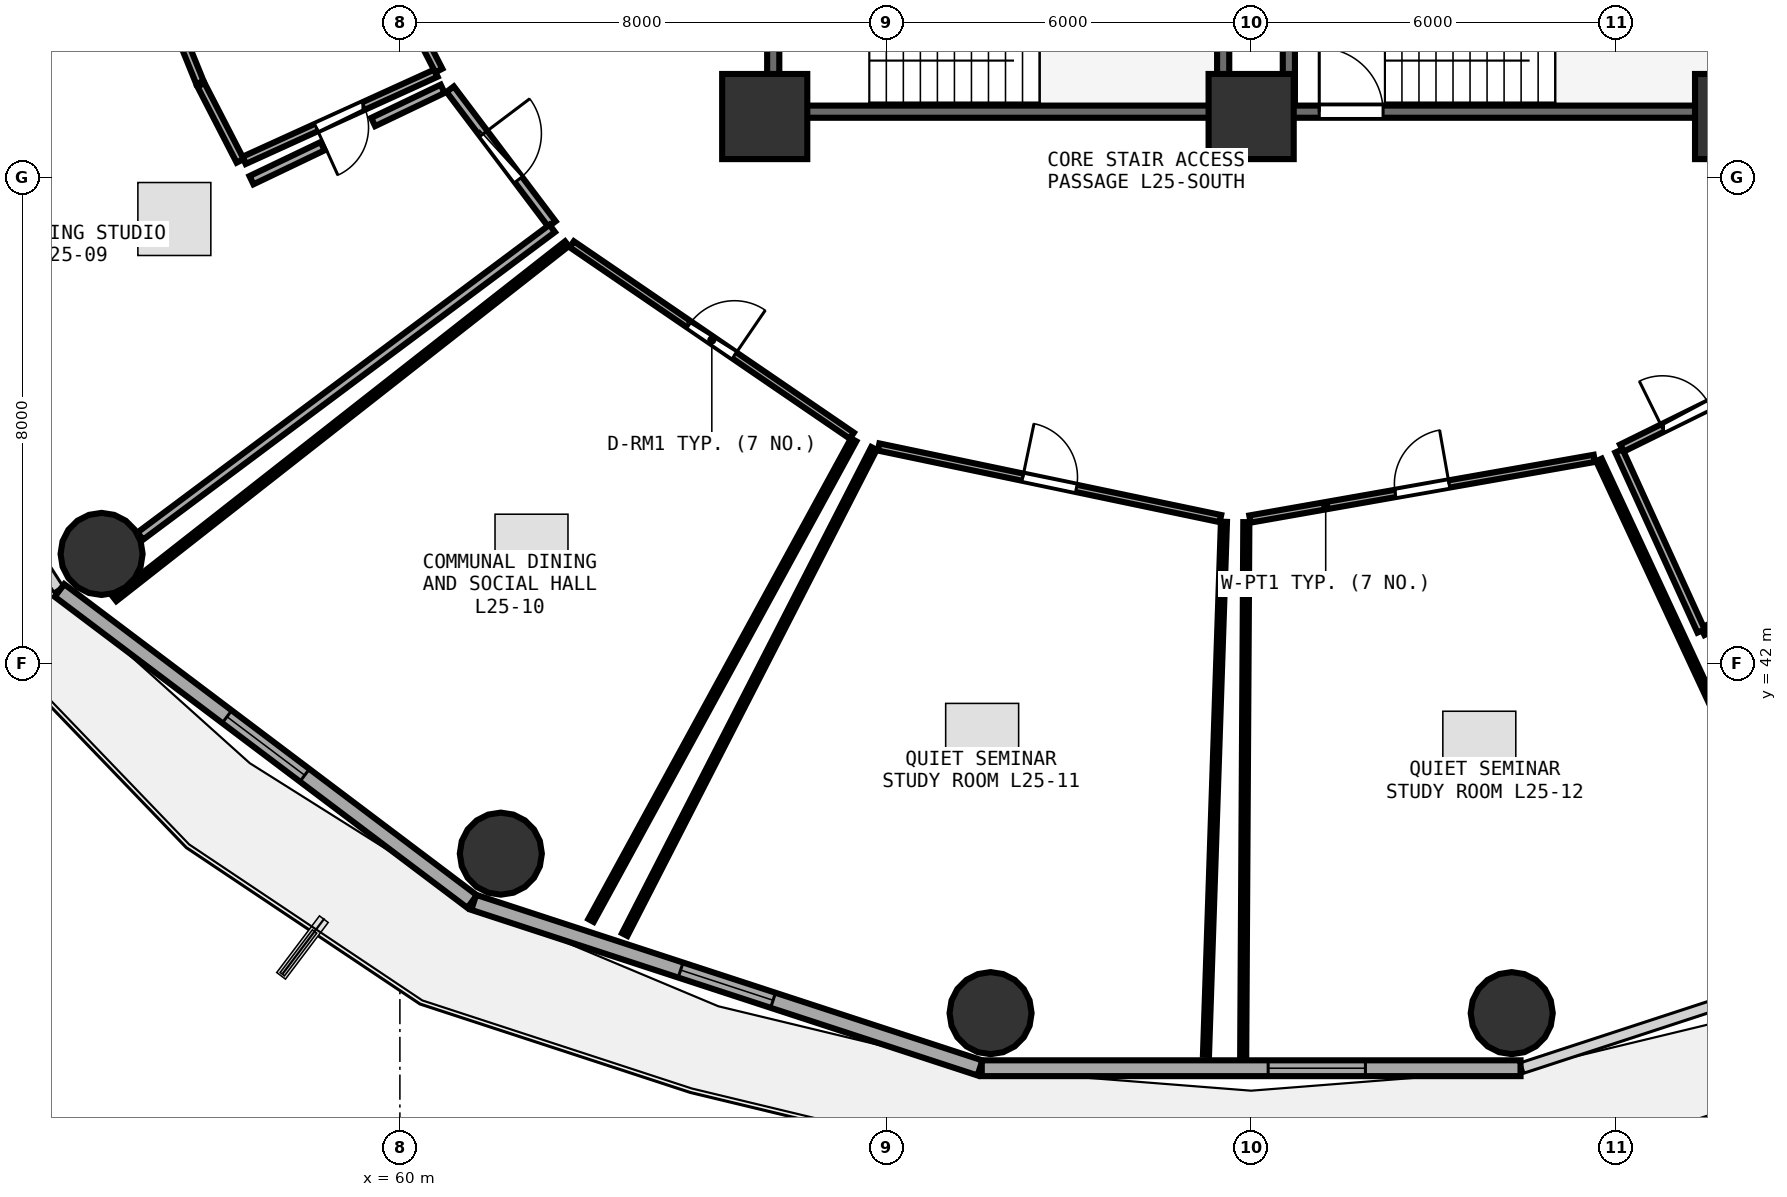
"""IFC4 building model, lengths in metres.
Left out: names, types, materials, properties, quantities, classifications, styles, units other than length and angle.
Written with IfcOpenShell. Run it as: python <this file> out.ifc"""

import sys

from ifc_helpers import new_model, si_unit, direction, frame, frame_2d, origin, origin_2d, place, context, subcontext, project, spatial, rectangle, circle, extrude, element, fill, save


model = new_model("IFC4")
c1 = context("Model", 3, precision=1e-05, world=origin(), true_north=direction((0.0, 1.0)))
c2 = subcontext(c1, "Body", "Model", "MODEL_VIEW")
j1 = project(units=[si_unit("LENGTHUNIT", "METRE"), si_unit("PLANEANGLEUNIT", "RADIAN")], contexts=[c1])
p1 = place(None, origin())
s1 = spatial("IfcSite", under=j1, at=p1, CompositionType="ELEMENT")
p2 = place(p1, origin())
s2 = spatial("IfcBuilding", under=s1, at=p2, CompositionType="ELEMENT")
p3 = place(p2, frame((0.0, 0.0, 98.85)))
s3 = spatial("IfcBuildingStorey", under=s2, at=p3, CompositionType="ELEMENT", Elevation=98.85)
for number, where, z_axis, x_axis in (
    (1, (66.0, 51.0, 0.0), (0.0, 0.0, 1.0), (1.0, 0.0, 0.0)),
    (2, (74.0, 51.0, 0.0), (0.0, 0.0, 1.0), (1.0, 0.0, 0.0)),
    (3, (82.0, 51.0, 0.0), (0.0, 0.0, 1.0), (1.0, 0.0, 0.0)),
):
    element("IfcColumn", number, at=place(p3, frame(where, z_axis=z_axis, x_axis=x_axis)), inside=s3, PredefinedType="PILASTER", context=c2, shape_type="SweptSolid", body=[
        extrude(rectangle(XDim=1.4, YDim=1.4, at=origin_2d()), origin(), (0.0, 0.0, 1.0), 3.75),
    ])
for number, where, z_axis, x_axis in (
    (4, (55.094, 43.807, 0.0), (0.0, 0.0, 1.0), (1.0, 0.0, 0.0)),
    (5, (61.66, 38.878, 0.0), (0.0, 0.0, 1.0), (1.0, 0.0, 0.0)),
    (6, (69.714, 36.255, 0.0), (0.0, 0.0, 1.0), (1.0, 0.0, 0.0)),
    (7, (78.286, 36.255, 0.0), (0.0, 0.0, 1.0), (1.0, 0.0, 0.0)),
):
    element("IfcColumn", number, at=place(p3, frame(where, z_axis=z_axis, x_axis=x_axis)), inside=s3, PredefinedType="COLUMN", context=c2, shape_type="SweptSolid", body=[
        extrude(circle(Radius=0.675, at=origin_2d()), origin(), (0.0, 0.0, 1.0), 3.75),
    ])
p4 = place(p3, frame((54.401, 43.207, 0.0), z_axis=(0.0, 0.0, 1.0), x_axis=(0.798501507879, -0.601992808857, 0.0)))
e8 = element("IfcWall", 8, at=p4, inside=s3, PredefinedType="SOLIDWALL", context=c2, shape_type="SweptSolid", body=[
    extrude(rectangle(XDim=8.499, YDim=0.26, at=frame_2d((4.25, 0.0))), origin(), (0.0, 0.0, 1.0), 3.475),
])
p5 = place(p4, frame((3.45, 0.0, 0.85)))
e9 = element("IfcOpeningElement", 9, at=p5, cuts=e8, PredefinedType="OPENING", context=c2, shape_type="SweptSolid", body=[
    extrude(rectangle(XDim=1.6, YDim=1.45, at=frame_2d((0.8, 0.725))), frame((0.0, 0.14, 0.0), z_axis=(0.0, -1.0, 0.0), x_axis=(1.0, 0.0, 0.0)), (0.0, 0.0, 1.0), 0.28),
])
p6 = place(p3, frame((61.214, 38.077, 0.0), z_axis=(0.0, 0.0, 1.0), x_axis=(0.950471101963, -0.310812941064, 0.0)))
e10 = element("IfcWall", 10, at=p6, inside=s3, PredefinedType="SOLIDWALL", context=c2, shape_type="SweptSolid", body=[
    extrude(rectangle(XDim=8.76, YDim=0.26, at=frame_2d((4.38, 0.0))), origin(), (0.0, 0.0, 1.0), 3.475),
])
p7 = place(p6, frame((3.58, 0.0, 0.85)))
e11 = element("IfcOpeningElement", 11, at=p7, cuts=e10, PredefinedType="OPENING", context=c2, shape_type="SweptSolid", body=[
    extrude(rectangle(XDim=1.6, YDim=1.45, at=frame_2d((0.8, 0.725))), frame((0.0, 0.14, 0.0), z_axis=(0.0, -1.0, 0.0), x_axis=(1.0, 0.0, 0.0)), (0.0, 0.0, 1.0), 0.28),
])
p8 = place(p3, frame((69.57, 35.349, 0.0), z_axis=(0.0, 0.0, 1.0), x_axis=(1.0, 0.0, 0.0)))
e12 = element("IfcWall", 12, at=p8, inside=s3, PredefinedType="SOLIDWALL", context=c2, shape_type="SweptSolid", body=[
    extrude(rectangle(XDim=8.861, YDim=0.26, at=frame_2d((4.43, 0.0))), origin(), (0.0, 0.0, 1.0), 3.475),
])
p9 = place(p8, frame((4.71, 0.0, 0.85)))
e13 = element("IfcOpeningElement", 13, at=p9, cuts=e12, PredefinedType="OPENING", context=c2, shape_type="SweptSolid", body=[
    extrude(rectangle(XDim=1.6, YDim=1.45, at=frame_2d((0.8, 0.725))), frame((0.0, 0.14, 0.0), z_axis=(0.0, -1.0, 0.0), x_axis=(1.0, 0.0, 0.0)), (0.0, 0.0, 1.0), 0.28),
])
p10 = place(p3, frame((74.0, 51.08, 0.0), z_axis=(0.0, 0.0, 1.0), x_axis=(1.0, 0.0, 0.0)))
e14 = element("IfcWall", 14, at=p10, inside=s3, PredefinedType="SHEAR", context=c2, shape_type="SweptSolid", body=[
    extrude(rectangle(XDim=7.9, YDim=0.2, at=frame_2d((3.95, 0.0))), origin(), (0.0, 0.0, 1.0), 3.49),
])
p11 = place(p10, frame((1.12, 0.0, 0.0)))
e15 = element("IfcOpeningElement", 15, at=p11, cuts=e14, PredefinedType="OPENING", context=c2, shape_type="SweptSolid", body=[
    extrude(rectangle(XDim=1.05, YDim=2.1, at=frame_2d((0.525, 1.05))), frame((0.0, 0.11, 0.0), z_axis=(0.0, -1.0, 0.0), x_axis=(1.0, 0.0, 0.0)), (0.0, 0.0, 1.0), 0.22),
])
p12 = place(p3, frame((74.62, 54.27, 0.0), z_axis=(0.0, 0.0, 1.0), x_axis=(0.0, -1.0, 0.0)))
e16 = element("IfcWall", 16, at=p12, inside=s3, PredefinedType="SHEAR", context=c2, shape_type="SweptSolid", body=[
    extrude(rectangle(XDim=3.07, YDim=0.2, at=frame_2d((1.535, 0.0))), origin(), (0.0, 0.0, 1.0), 3.49),
])
p13 = place(p3, frame((66.26, 51.08, 0.0), z_axis=(0.0, 0.0, 1.0), x_axis=(1.0, 0.0, 0.0)))
e17 = element("IfcWall", 17, at=p13, inside=s3, PredefinedType="SHEAR", context=c2, shape_type="SweptSolid", body=[
    extrude(rectangle(XDim=7.16, YDim=0.2, at=frame_2d((3.58, 0.0))), origin(), (0.0, 0.0, 1.0), 3.49),
])
p14 = place(p3, frame((73.54, 51.2, 0.0), z_axis=(0.0, 0.0, 1.0), x_axis=(0.0, 1.0, 0.0)))
e18 = element("IfcWall", 18, at=p14, inside=s3, PredefinedType="SHEAR", context=c2, shape_type="SweptSolid", body=[
    extrude(rectangle(XDim=3.07, YDim=0.2, at=frame_2d((1.535, 0.0))), origin(), (0.0, 0.0, 1.0), 3.49),
])
p15 = place(p3, frame((66.14, 54.27, 0.0), z_axis=(0.0, 0.0, 1.0), x_axis=(0.0, -1.0, 0.0)))
e19 = element("IfcWall", 19, at=p15, inside=s3, PredefinedType="SHEAR", context=c2, shape_type="SweptSolid", body=[
    extrude(rectangle(XDim=3.07, YDim=0.2, at=frame_2d((1.535, 0.0))), origin(), (0.0, 0.0, 1.0), 3.49),
])
p16 = place(p15, frame((1.01, 0.0, 0.0)))
e20 = element("IfcOpeningElement", 20, at=p16, cuts=e19, PredefinedType="OPENING", context=c2, shape_type="SweptSolid", body=[
    extrude(rectangle(XDim=1.05, YDim=2.1, at=frame_2d((0.525, 1.05))), frame((0.0, 0.11, 0.0), z_axis=(0.0, -1.0, 0.0), x_axis=(1.0, 0.0, 0.0)), (0.0, 0.0, 1.0), 0.22),
])
p17 = place(p3, frame((60.594, 51.714, 0.0), z_axis=(0.0, 0.0, 1.0), x_axis=(-0.910380938799, -0.413771127885, 0.0)))
e21 = element("IfcWall", 21, at=p17, inside=s3, PredefinedType="PLUMBINGWALL", context=c2, shape_type="SweptSolid", body=[
    extrude(rectangle(XDim=3.469, YDim=0.13, at=frame_2d((1.734, 0.0))), origin(), (0.0, 0.0, 1.0), 2.925),
])
p18 = place(p17, frame((1.304, 0.0, 0.0)))
e22 = element("IfcOpeningElement", 22, at=p18, cuts=e21, PredefinedType="OPENING", context=c2, shape_type="SweptSolid", body=[
    extrude(rectangle(XDim=0.86, YDim=2.05, at=frame_2d((0.43, 1.025))), frame((0.0, 0.075, 0.0), z_axis=(0.0, -1.0, 0.0), x_axis=(1.0, 0.0, 0.0)), (0.0, 0.0, 1.0), 0.15),
])
p19 = place(p3, frame((60.827, 51.45, 0.0), z_axis=(0.0, 0.0, 1.0), x_axis=(0.602330864847, -0.798246534131, 0.0)))
e23 = element("IfcWall", 23, at=p19, inside=s3, PredefinedType="PARTITIONING", context=c2, shape_type="SweptSolid", body=[
    extrude(rectangle(XDim=2.779, YDim=0.15, at=frame_2d((1.389, 0.0))), origin(), (0.0, 0.0, 1.0), 2.925),
])
p20 = place(p19, frame((0.914, 0.0, 0.0)))
e24 = element("IfcOpeningElement", 24, at=p20, cuts=e23, PredefinedType="OPENING", context=c2, shape_type="SweptSolid", body=[
    extrude(rectangle(XDim=0.95, YDim=2.08, at=frame_2d((0.475, 1.04))), frame((0.0, 0.085, 0.0), z_axis=(0.0, -1.0, 0.0), x_axis=(1.0, 0.0, 0.0)), (0.0, 0.0, 1.0), 0.17),
])
p21 = place(p3, frame((62.827, 48.899, 0.0), z_axis=(0.0, 0.0, 1.0), x_axis=(0.825618475233, -0.564228795219, 0.0)))
e25 = element("IfcWall", 25, at=p21, inside=s3, PredefinedType="PARTITIONING", context=c2, shape_type="SweptSolid", body=[
    extrude(rectangle(XDim=5.578, YDim=0.12, at=frame_2d((2.789, 0.0))), origin(), (0.0, 0.0, 1.0), 2.925),
])
p22 = place(p21, frame((2.339, 0.0, 0.0)))
e26 = element("IfcOpeningElement", 26, at=p22, cuts=e25, PredefinedType="OPENING", context=c2, shape_type="SweptSolid", body=[
    extrude(rectangle(XDim=0.9, YDim=2.08, at=frame_2d((0.45, 1.04))), frame((0.0, 0.07, 0.0), z_axis=(0.0, -1.0, 0.0), x_axis=(1.0, 0.0, 0.0)), (0.0, 0.0, 1.0), 0.14),
])
p23 = place(p3, frame((67.874, 45.566, 0.0), z_axis=(0.0, 0.0, 1.0), x_axis=(0.978759890472, -0.205009943184, 0.0)))
e27 = element("IfcWall", 27, at=p23, inside=s3, PredefinedType="PARTITIONING", context=c2, shape_type="SweptSolid", body=[
    extrude(rectangle(XDim=5.744, YDim=0.12, at=frame_2d((2.872, 0.0))), origin(), (0.0, 0.0, 1.0), 3.235),
])
p24 = place(p23, frame((2.422, 0.0, 0.0)))
e28 = element("IfcOpeningElement", 28, at=p24, cuts=e27, PredefinedType="OPENING", context=c2, shape_type="SweptSolid", body=[
    extrude(rectangle(XDim=0.9, YDim=2.08, at=frame_2d((0.45, 1.04))), frame((0.0, 0.07, 0.0), z_axis=(0.0, -1.0, 0.0), x_axis=(1.0, 0.0, 0.0)), (0.0, 0.0, 1.0), 0.14),
])
p25 = place(p3, frame((73.98, 44.38, 0.0), z_axis=(0.0, 0.0, 1.0), x_axis=(0.984819435921, 0.17358190756, 0.0)))
e29 = element("IfcWall", 29, at=p25, inside=s3, PredefinedType="PARTITIONING", context=c2, shape_type="SweptSolid", body=[
    extrude(rectangle(XDim=5.751, YDim=0.12, at=frame_2d((2.875, 0.0))), origin(), (0.0, 0.0, 1.0), 3.235),
])
p26 = place(p25, frame((2.426, 0.0, 0.0)))
e30 = element("IfcOpeningElement", 30, at=p26, cuts=e29, PredefinedType="OPENING", context=c2, shape_type="SweptSolid", body=[
    extrude(rectangle(XDim=0.9, YDim=2.08, at=frame_2d((0.45, 1.04))), frame((0.0, 0.07, 0.0), z_axis=(0.0, -1.0, 0.0), x_axis=(1.0, 0.0, 0.0)), (0.0, 0.0, 1.0), 0.14),
])
p27 = place(p3, frame((80.095, 45.546, 0.0), z_axis=(0.0, 0.0, 1.0), x_axis=(0.897003770221, 0.442022891046, 0.0)))
e31 = element("IfcWall", 31, at=p27, inside=s3, PredefinedType="PLUMBINGWALL", context=c2, shape_type="SweptSolid", body=[
    extrude(rectangle(XDim=2.355, YDim=0.13, at=frame_2d((1.178, 0.0))), origin(), (0.0, 0.0, 1.0), 2.925),
])
p28 = place(p27, frame((0.747, 0.0, 0.0)))
e32 = element("IfcOpeningElement", 32, at=p28, cuts=e31, PredefinedType="OPENING", context=c2, shape_type="SweptSolid", body=[
    extrude(rectangle(XDim=0.86, YDim=2.05, at=frame_2d((0.43, 1.025))), frame((0.0, 0.075, 0.0), z_axis=(0.0, -1.0, 0.0), x_axis=(1.0, 0.0, 0.0)), (0.0, 0.0, 1.0), 0.15),
])
p29 = place(p3, frame((59.535, 54.165, 0.0), z_axis=(0.0, 0.0, 1.0), x_axis=(-0.968404670054, -0.249384031201, 0.0)))
e33 = element("IfcWall", 33, at=p29, inside=s3, PredefinedType="PARTITIONING", context=c2, shape_type="SweptSolid", body=[
    extrude(rectangle(XDim=9.881, YDim=0.1, at=frame_2d((4.94, 0.0))), origin(), (0.0, 0.0, 1.0), 2.975),
])
p30 = place(p3, frame((60.125, 52.761, 0.0), z_axis=(0.0, 0.0, 1.0), x_axis=(0.456189291516, -0.889882762113, 0.0)))
e34 = element("IfcWall", 34, at=p30, inside=s3, PredefinedType="PLUMBINGWALL", context=c2, shape_type="SweptSolid", body=[
    extrude(rectangle(XDim=1.129, YDim=0.13, at=frame_2d((0.564, 0.0))), origin(), (0.0, 0.0, 1.0), 3.235),
])
p31 = place(p3, frame((57.373, 50.272, 0.0), z_axis=(0.0, 0.0, 1.0), x_axis=(-0.458147751042, 0.888876053348, 0.0)))
e35 = element("IfcWall", 35, at=p31, inside=s3, PredefinedType="PLUMBINGWALL", context=c2, shape_type="SweptSolid", body=[
    extrude(rectangle(XDim=1.407, YDim=0.13, at=frame_2d((0.703, 0.0))), origin(), (0.0, 0.0, 1.0), 2.925),
])
p32 = place(p3, frame((56.711, 51.559, 0.0), z_axis=(0.0, 0.0, 1.0), x_axis=(-0.376021150564, 0.926611080405, 0.0)))
e36 = element("IfcWall", 36, at=p32, inside=s3, PredefinedType="PLUMBINGWALL", context=c2, shape_type="SweptSolid", body=[
    extrude(rectangle(XDim=1.398, YDim=0.13, at=frame_2d((0.699, 0.0))), origin(), (0.0, 0.0, 1.0), 3.175),
])
p33 = place(p3, frame((62.505, 49.16, 0.0), z_axis=(0.0, 0.0, 1.0), x_axis=(-0.801231684565, -0.598354232582, 0.0)))
e37 = element("IfcWall", 37, at=p33, inside=s3, PredefinedType="PARTITIONING", context=c2, shape_type="SweptSolid", body=[
    extrude(rectangle(XDim=8.456, YDim=0.15, at=frame_2d((4.228, 0.0))), origin(), (0.0, 0.0, 1.0), 2.925),
])
p34 = place(p3, frame((50.146, 51.176, 0.0), z_axis=(0.0, 0.0, 1.0), x_axis=(0.962685643461, 0.270622157028, 0.0)))
e38 = element("IfcWall", 38, at=p34, inside=s3, PredefinedType="PARTITIONING", context=c2, shape_type="SweptSolid", body=[
    extrude(rectangle(XDim=6.187, YDim=0.15, at=frame_2d((3.094, 0.0))), origin(), (0.0, 0.0, 1.0), 2.975),
])
p35 = place(p3, frame((57.559, 49.953, 0.0), z_axis=(0.0, 0.0, 1.0), x_axis=(0.902185129063, 0.431349038364, 0.0)))
e39 = element("IfcWall", 39, at=p35, inside=s3, PredefinedType="PARTITIONING", context=c2, shape_type="SweptSolid", body=[
    extrude(rectangle(XDim=1.298, YDim=0.15, at=frame_2d((0.649, 0.0))), origin(), (0.0, 0.0, 1.0), 3.175),
])
p36 = place(p3, frame((59.561, 50.91, 0.0), z_axis=(0.0, 0.0, 1.0), x_axis=(0.902228812368, 0.431257660955, 0.0)))
e40 = element("IfcWall", 40, at=p36, inside=s3, PredefinedType="PARTITIONING", context=c2, shape_type="SweptSolid", body=[
    extrude(rectangle(XDim=1.266, YDim=0.15, at=frame_2d((0.633, 0.0))), origin(), (0.0, 0.0, 1.0), 2.925),
])
p37 = place(p3, frame((67.463, 45.683, 0.0), z_axis=(0.0, 0.0, 1.0), x_axis=(-0.479571724153, -0.87750268455, 0.0)))
e41 = element("IfcWall", 41, at=p37, inside=s3, PredefinedType="PARTITIONING", context=c2, shape_type="SweptSolid", body=[
    extrude(rectangle(XDim=9.007, YDim=0.1, at=frame_2d((4.503, 0.0))), origin(), (0.0, 0.0, 1.0), 2.925),
])
p38 = place(p3, frame((55.305, 43.071, 0.0), z_axis=(0.0, 0.0, 1.0), x_axis=(0.78679196563, 0.6172182781, 0.0)))
e42 = element("IfcWall", 42, at=p38, inside=s3, PredefinedType="PARTITIONING", context=c2, shape_type="SweptSolid", body=[
    extrude(rectangle(XDim=9.458, YDim=0.1, at=frame_2d((4.729, 0.0))), origin(), (0.0, 0.0, 1.0), 2.925),
])
p39 = place(p3, frame((73.553, 44.336, 0.0), z_axis=(0.0, 0.0, 1.0), x_axis=(-0.033680921614, -0.999432636809, 0.0)))
e43 = element("IfcWall", 43, at=p39, inside=s3, PredefinedType="PARTITIONING", context=c2, shape_type="SweptSolid", body=[
    extrude(rectangle(XDim=8.771, YDim=0.1, at=frame_2d((4.385, 0.0))), origin(), (0.0, 0.0, 1.0), 2.975),
])
p40 = place(p3, frame((63.697, 37.548, 0.0), z_axis=(0.0, 0.0, 1.0), x_axis=(0.456266444918, 0.889843205987, 0.0)))
e44 = element("IfcWall", 44, at=p40, inside=s3, PredefinedType="PARTITIONING", context=c2, shape_type="SweptSolid", body=[
    extrude(rectangle(XDim=8.985, YDim=0.1, at=frame_2d((4.492, 0.0))), origin(), (0.0, 0.0, 1.0), 2.925),
])
p41 = place(p3, frame((79.72, 45.353, 0.0), z_axis=(0.0, 0.0, 1.0), x_axis=(0.422225492456, -0.906490834769, 0.0)))
e45 = element("IfcWall", 45, at=p41, inside=s3, PredefinedType="PARTITIONING", context=c2, shape_type="SweptSolid", body=[
    extrude(rectangle(XDim=8.953, YDim=0.1, at=frame_2d((4.476, 0.0))), origin(), (0.0, 0.0, 1.0), 2.925),
])
p42 = place(p3, frame((73.869, 35.56, 0.0), z_axis=(0.0, 0.0, 1.0), x_axis=(0.005901573079, 0.999982585566, 0.0)))
e46 = element("IfcWall", 46, at=p42, inside=s3, PredefinedType="PARTITIONING", context=c2, shape_type="SweptSolid", body=[
    extrude(rectangle(XDim=8.77, YDim=0.1, at=frame_2d((4.385, 0.0))), origin(), (0.0, 0.0, 1.0), 2.975),
])
p43 = place(p3, frame((84.112, 43.87, 0.0), z_axis=(0.0, 0.0, 1.0), x_axis=(-0.89496337821, -0.446139610059, 0.0)))
e47 = element("IfcWall", 47, at=p43, inside=s3, PredefinedType="PLUMBINGWALL", context=c2, shape_type="SweptSolid", body=[
    extrude(rectangle(XDim=3.001, YDim=0.13, at=frame_2d((1.501, 0.0))), origin(), (0.0, 0.0, 1.0), 3.175),
])
p44 = place(p3, frame((81.4, 42.54, 0.0), z_axis=(0.0, 0.0, 1.0), x_axis=(-0.414882082756, 0.909875187819, 0.0)))
e48 = element("IfcWall", 48, at=p44, inside=s3, PredefinedType="PLUMBINGWALL", context=c2, shape_type="SweptSolid", body=[
    extrude(rectangle(XDim=3.255, YDim=0.13, at=frame_2d((1.627, 0.0))), origin(), (0.0, 0.0, 1.0), 2.925),
])
p45 = place(p5, origin())
e49 = element("IfcWindow", 49, at=p45, inside=s3, PartitioningType="SINGLE_PANEL", PredefinedType="WINDOW", context=c2, shape_type="SweptSolid", body=[
    extrude(rectangle(XDim=1.6, YDim=1.45, at=frame_2d((0.8, 0.725))), frame((0.0, 0.03, 0.0), z_axis=(0.0, -1.0, 0.0), x_axis=(1.0, 0.0, 0.0)), (0.0, 0.0, 1.0), 0.06),
])
fill(e9, e49)
p46 = place(p7, origin())
e50 = element("IfcWindow", 50, at=p46, inside=s3, PartitioningType="SINGLE_PANEL", PredefinedType="WINDOW", context=c2, shape_type="SweptSolid", body=[
    extrude(rectangle(XDim=1.6, YDim=1.45, at=frame_2d((0.8, 0.725))), frame((0.0, 0.03, 0.0), z_axis=(0.0, -1.0, 0.0), x_axis=(1.0, 0.0, 0.0)), (0.0, 0.0, 1.0), 0.06),
])
fill(e11, e50)
p47 = place(p9, origin())
e51 = element("IfcWindow", 51, at=p47, inside=s3, PartitioningType="SINGLE_PANEL", PredefinedType="WINDOW", context=c2, shape_type="SweptSolid", body=[
    extrude(rectangle(XDim=1.6, YDim=1.45, at=frame_2d((0.8, 0.725))), frame((0.0, 0.03, 0.0), z_axis=(0.0, -1.0, 0.0), x_axis=(1.0, 0.0, 0.0)), (0.0, 0.0, 1.0), 0.06),
])
fill(e13, e51)
p48 = place(p11, origin())
e52 = element("IfcDoor", 52, at=p48, inside=s3, OperationType="SINGLE_SWING_LEFT", PredefinedType="DOOR", context=c2, shape_type="SweptSolid", body=[
    extrude(rectangle(XDim=1.05, YDim=2.1, at=frame_2d((0.525, 1.05))), frame((0.0, 0.025, 0.0), z_axis=(0.0, -1.0, 0.0), x_axis=(1.0, 0.0, 0.0)), (0.0, 0.0, 1.0), 0.05),
])
fill(e15, e52)
p49 = place(p18, origin())
e53 = element("IfcDoor", 53, at=p49, inside=s3, OperationType="SINGLE_SWING_RIGHT", PredefinedType="DOOR", context=c2, shape_type="SweptSolid", body=[
    extrude(rectangle(XDim=0.86, YDim=2.05, at=frame_2d((0.43, 1.025))), frame((0.0, 0.025, 0.0), z_axis=(0.0, -1.0, 0.0), x_axis=(1.0, 0.0, 0.0)), (0.0, 0.0, 1.0), 0.05),
])
fill(e22, e53)
p50 = place(p20, origin())
e54 = element("IfcDoor", 54, at=p50, inside=s3, OperationType="SINGLE_SWING_LEFT", PredefinedType="DOOR", context=c2, shape_type="SweptSolid", body=[
    extrude(rectangle(XDim=0.95, YDim=2.08, at=frame_2d((0.475, 1.04))), frame((0.0, 0.025, 0.0), z_axis=(0.0, -1.0, 0.0), x_axis=(1.0, 0.0, 0.0)), (0.0, 0.0, 1.0), 0.05),
])
fill(e24, e54)
p51 = place(p22, origin())
e55 = element("IfcDoor", 55, at=p51, inside=s3, OperationType="SINGLE_SWING_RIGHT", PredefinedType="DOOR", context=c2, shape_type="SweptSolid", body=[
    extrude(rectangle(XDim=0.9, YDim=2.08, at=frame_2d((0.45, 1.04))), frame((0.0, 0.025, 0.0), z_axis=(0.0, -1.0, 0.0), x_axis=(1.0, 0.0, 0.0)), (0.0, 0.0, 1.0), 0.05),
])
fill(e26, e55)
p52 = place(p24, origin())
e56 = element("IfcDoor", 56, at=p52, inside=s3, OperationType="SINGLE_SWING_LEFT", PredefinedType="DOOR", context=c2, shape_type="SweptSolid", body=[
    extrude(rectangle(XDim=0.9, YDim=2.08, at=frame_2d((0.45, 1.04))), frame((0.0, 0.025, 0.0), z_axis=(0.0, -1.0, 0.0), x_axis=(1.0, 0.0, 0.0)), (0.0, 0.0, 1.0), 0.05),
])
fill(e28, e56)
p53 = place(p26, origin())
e57 = element("IfcDoor", 57, at=p53, inside=s3, OperationType="SINGLE_SWING_RIGHT", PredefinedType="DOOR", context=c2, shape_type="SweptSolid", body=[
    extrude(rectangle(XDim=0.9, YDim=2.08, at=frame_2d((0.45, 1.04))), frame((0.0, 0.025, 0.0), z_axis=(0.0, -1.0, 0.0), x_axis=(1.0, 0.0, 0.0)), (0.0, 0.0, 1.0), 0.05),
])
fill(e30, e57)
p54 = place(p28, origin())
e58 = element("IfcDoor", 58, at=p54, inside=s3, OperationType="SINGLE_SWING_LEFT", PredefinedType="DOOR", context=c2, shape_type="SweptSolid", body=[
    extrude(rectangle(XDim=0.86, YDim=2.05, at=frame_2d((0.43, 1.025))), frame((0.0, 0.025, 0.0), z_axis=(0.0, -1.0, 0.0), x_axis=(1.0, 0.0, 0.0)), (0.0, 0.0, 1.0), 0.05),
])
fill(e32, e58)
save(model, sys.argv[1])
